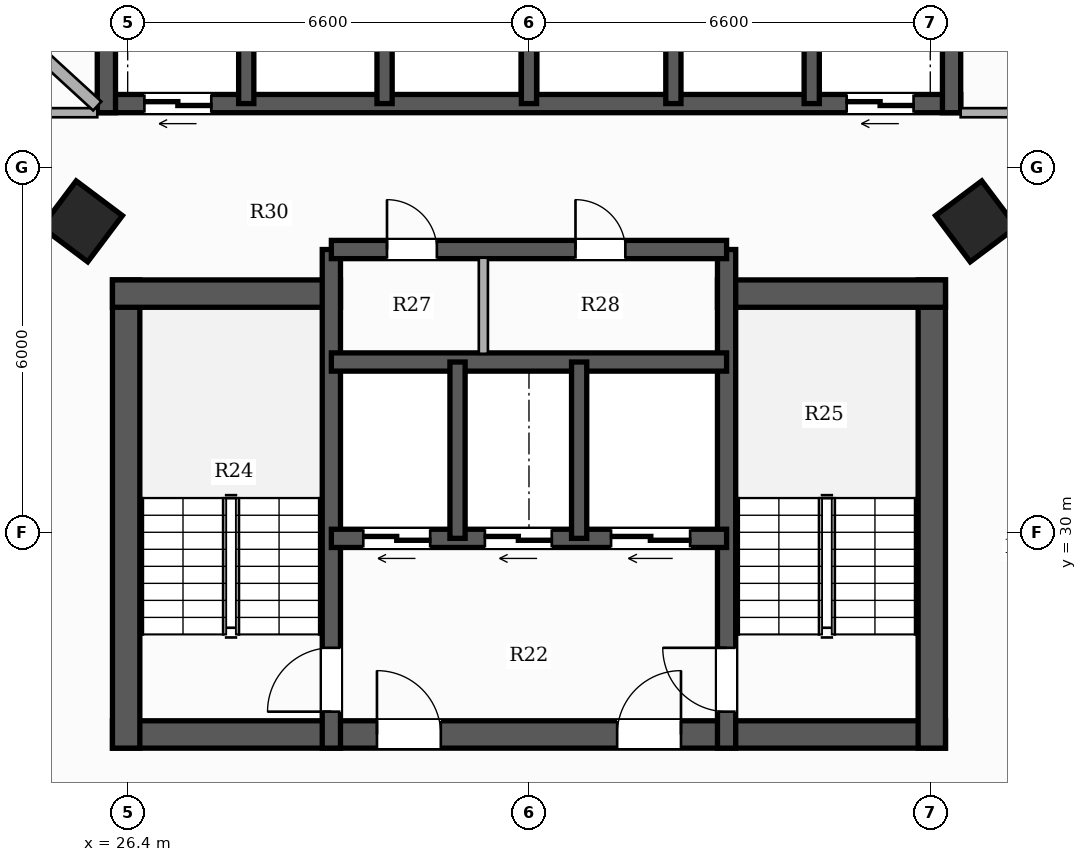
"""IFC4 building model, lengths in metres.
Left out: names, types, materials, properties, quantities, classifications, styles, units other than length and angle.
Written with IfcOpenShell. Run it as: python <this file> out.ifc"""

import sys

from ifc_helpers import new_model, si_unit, direction, frame, frame_2d, origin, origin_2d, place, context, subcontext, project, spatial, rectangle, hollow_rectangle, extrude, element, fill, save


model = new_model("IFC4")
c1 = context("Model", 3, precision=1e-05, world=origin(), true_north=direction((0.0, 1.0)))
c2 = subcontext(c1, "Body", "Model", "MODEL_VIEW")
j1 = project(units=[si_unit("LENGTHUNIT", "METRE"), si_unit("PLANEANGLEUNIT", "RADIAN")], contexts=[c1])
p1 = place(None, origin())
s1 = spatial("IfcSite", under=j1, at=p1, CompositionType="ELEMENT")
p2 = place(p1, origin())
s2 = spatial("IfcBuilding", under=s1, at=p2, CompositionType="ELEMENT")
p3 = place(p2, frame((0.0, 0.0, 33.5)))
s3 = spatial("IfcBuildingStorey", under=s2, at=p3, CompositionType="ELEMENT", Elevation=33.5)
p4 = place(p3, frame((26.15, 26.675, 0.0), z_axis=(0.0, 0.0, 1.0), x_axis=(1.0, 0.0, 0.0)))
e1 = element("IfcWall", 1, at=p4, inside=s3, PredefinedType="SHEAR", context=c2, shape_type="SweptSolid", body=[
    extrude(rectangle(XDim=13.7, YDim=0.45, at=frame_2d((6.85, 0.0))), origin(), (0.0, 0.0, 1.0), 3.3),
])
p5 = place(p4, frame((4.35, 0.0, 0.0)))
e2 = element("IfcOpeningElement", 2, at=p5, cuts=e1, PredefinedType="OPENING", context=c2, shape_type="SweptSolid", body=[
    extrude(rectangle(XDim=1.05, YDim=2.15, at=frame_2d((0.525, 1.075))), frame((0.0, 0.235, 0.0), z_axis=(0.0, -1.0, 0.0), x_axis=(1.0, 0.0, 0.0)), (0.0, 0.0, 1.0), 0.47),
])
p6 = place(p4, frame((8.3, 0.0, 0.0)))
e3 = element("IfcOpeningElement", 3, at=p6, cuts=e1, PredefinedType="OPENING", context=c2, shape_type="SweptSolid", body=[
    extrude(rectangle(XDim=1.05, YDim=2.15, at=frame_2d((0.525, 1.075))), frame((0.0, 0.235, 0.0), z_axis=(0.0, -1.0, 0.0), x_axis=(1.0, 0.0, 0.0)), (0.0, 0.0, 1.0), 0.47),
])
p7 = place(p3, frame((26.375, 26.45, 0.0), z_axis=(0.0, 0.0, 1.0), x_axis=(0.0, 1.0, 0.0)))
e4 = element("IfcWall", 4, at=p7, inside=s3, PredefinedType="SHEAR", context=c2, shape_type="SweptSolid", body=[
    extrude(rectangle(XDim=7.7, YDim=0.45, at=frame_2d((3.85, 0.0))), origin(), (0.0, 0.0, 1.0), 3.3),
])
p8 = place(p3, frame((26.15, 33.925, 0.0), z_axis=(0.0, 0.0, 1.0), x_axis=(1.0, 0.0, 0.0)))
e5 = element("IfcWall", 5, at=p8, inside=s3, PredefinedType="SHEAR", context=c2, shape_type="SweptSolid", body=[
    extrude(rectangle(XDim=3.75, YDim=0.45, at=frame_2d((1.875, 0.0))), origin(), (0.0, 0.0, 1.0), 3.3),
])
p9 = place(p3, frame((39.625, 26.45, 0.0), z_axis=(0.0, 0.0, 1.0), x_axis=(0.0, 1.0, 0.0)))
e6 = element("IfcWall", 6, at=p9, inside=s3, PredefinedType="SHEAR", context=c2, shape_type="SweptSolid", body=[
    extrude(rectangle(XDim=7.7, YDim=0.45, at=frame_2d((3.85, 0.0))), origin(), (0.0, 0.0, 1.0), 3.3),
])
p10 = place(p3, frame((36.1, 33.925, 0.0), z_axis=(0.0, 0.0, 1.0), x_axis=(1.0, 0.0, 0.0)))
e7 = element("IfcWall", 7, at=p10, inside=s3, PredefinedType="SHEAR", context=c2, shape_type="SweptSolid", body=[
    extrude(rectangle(XDim=3.75, YDim=0.45, at=frame_2d((1.875, 0.0))), origin(), (0.0, 0.0, 1.0), 3.3),
])
p11 = place(p3, frame((29.75, 26.45, 0.0), z_axis=(0.0, 0.0, 1.0), x_axis=(0.0, 1.0, 0.0)))
e8 = element("IfcWall", 8, at=p11, inside=s3, PredefinedType="SHEAR", context=c2, shape_type="SweptSolid", body=[
    extrude(rectangle(XDim=8.2, YDim=0.3, at=frame_2d((4.1, 0.0))), origin(), (0.0, 0.0, 1.0), 3.3),
])
p12 = place(p11, frame((0.6, 0.0, 0.0)))
e9 = element("IfcOpeningElement", 9, at=p12, cuts=e8, PredefinedType="OPENING", context=c2, shape_type="SweptSolid", body=[
    extrude(rectangle(XDim=1.05, YDim=2.15, at=frame_2d((0.525, 1.075))), frame((0.0, 0.16, 0.0), z_axis=(0.0, -1.0, 0.0), x_axis=(1.0, 0.0, 0.0)), (0.0, 0.0, 1.0), 0.32),
])
p13 = place(p3, frame((36.25, 26.45, 0.0), z_axis=(0.0, 0.0, 1.0), x_axis=(0.0, 1.0, 0.0)))
e10 = element("IfcWall", 10, at=p13, inside=s3, PredefinedType="SHEAR", context=c2, shape_type="SweptSolid", body=[
    extrude(rectangle(XDim=8.2, YDim=0.3, at=frame_2d((4.1, 0.0))), origin(), (0.0, 0.0, 1.0), 3.3),
])
p14 = place(p13, frame((0.6, 0.0, 0.0)))
e11 = element("IfcOpeningElement", 11, at=p14, cuts=e10, PredefinedType="OPENING", context=c2, shape_type="SweptSolid", body=[
    extrude(rectangle(XDim=1.05, YDim=2.15, at=frame_2d((0.525, 1.075))), frame((0.0, 0.16, 0.0), z_axis=(0.0, -1.0, 0.0), x_axis=(1.0, 0.0, 0.0)), (0.0, 0.0, 1.0), 0.32),
])
p15 = place(p3, frame((36.25, 29.9, 0.0), z_axis=(0.0, 0.0, 1.0), x_axis=(-1.0, 0.0, 0.0)))
e12 = element("IfcWall", 12, at=p15, inside=s3, PredefinedType="SHEAR", context=c2, shape_type="SweptSolid", body=[
    extrude(rectangle(XDim=6.5, YDim=0.3, at=frame_2d((3.25, 0.0))), origin(), (0.0, 0.0, 1.0), 3.3),
])
p16 = place(p15, frame((4.875, 0.0, 0.0)))
e13 = element("IfcOpeningElement", 13, at=p16, cuts=e12, PredefinedType="OPENING", context=c2, shape_type="SweptSolid", body=[
    extrude(rectangle(XDim=1.1, YDim=2.2, at=frame_2d((0.55, 1.1))), frame((0.0, 0.16, 0.0), z_axis=(0.0, -1.0, 0.0), x_axis=(1.0, 0.0, 0.0)), (0.0, 0.0, 1.0), 0.32),
])
p17 = place(p15, frame((2.875, 0.0, 0.0)))
e14 = element("IfcOpeningElement", 14, at=p17, cuts=e12, PredefinedType="OPENING", context=c2, shape_type="SweptSolid", body=[
    extrude(rectangle(XDim=1.1, YDim=2.2, at=frame_2d((0.55, 1.1))), frame((0.0, 0.16, 0.0), z_axis=(0.0, -1.0, 0.0), x_axis=(1.0, 0.0, 0.0)), (0.0, 0.0, 1.0), 0.32),
])
p18 = place(p15, frame((0.6, 0.0, 0.0)))
e15 = element("IfcOpeningElement", 15, at=p18, cuts=e12, PredefinedType="OPENING", context=c2, shape_type="SweptSolid", body=[
    extrude(rectangle(XDim=1.3, YDim=2.2, at=frame_2d((0.65, 1.1))), frame((0.0, 0.16, 0.0), z_axis=(0.0, -1.0, 0.0), x_axis=(1.0, 0.0, 0.0)), (0.0, 0.0, 1.0), 0.32),
])
p19 = place(p3, frame((29.75, 32.8, 0.0), z_axis=(0.0, 0.0, 1.0), x_axis=(1.0, 0.0, 0.0)))
e16 = element("IfcWall", 16, at=p19, inside=s3, PredefinedType="SHEAR", context=c2, shape_type="SweptSolid", body=[
    extrude(rectangle(XDim=6.5, YDim=0.3, at=frame_2d((3.25, 0.0))), origin(), (0.0, 0.0, 1.0), 3.3),
])
for number, where, z_axis, x_axis in (
    (17, (31.825, 29.9, 0.0), (0.0, 0.0, 1.0), (0.0, 1.0, 0.0)),
    (18, (33.825, 29.9, 0.0), (0.0, 0.0, 1.0), (0.0, 1.0, 0.0)),
):
    element("IfcWall", number, at=place(p3, frame(where, z_axis=z_axis, x_axis=x_axis)), inside=s3, PredefinedType="SHEAR", context=c2, shape_type="SweptSolid", body=[
        extrude(rectangle(XDim=2.9, YDim=0.25, at=frame_2d((1.45, 0.0))), origin(), (0.0, 0.0, 1.0), 3.3),
    ])
p20 = place(p3, frame((29.75, 34.65, 0.0), z_axis=(0.0, 0.0, 1.0), x_axis=(1.0, 0.0, 0.0)))
e19 = element("IfcWall", 19, at=p20, inside=s3, PredefinedType="SHEAR", context=c2, shape_type="SweptSolid", body=[
    extrude(rectangle(XDim=6.5, YDim=0.3, at=frame_2d((3.25, 0.0))), origin(), (0.0, 0.0, 1.0), 3.3),
])
p21 = place(p20, frame((0.915, 0.0, 0.0)))
e20 = element("IfcOpeningElement", 20, at=p21, cuts=e19, PredefinedType="OPENING", context=c2, shape_type="SweptSolid", body=[
    extrude(rectangle(XDim=0.82, YDim=2.1, at=frame_2d((0.41, 1.05))), frame((0.0, 0.16, 0.0), z_axis=(0.0, -1.0, 0.0), x_axis=(1.0, 0.0, 0.0)), (0.0, 0.0, 1.0), 0.32),
])
p22 = place(p20, frame((4.015, 0.0, 0.0)))
e21 = element("IfcOpeningElement", 21, at=p22, cuts=e19, PredefinedType="OPENING", context=c2, shape_type="SweptSolid", body=[
    extrude(rectangle(XDim=0.82, YDim=2.1, at=frame_2d((0.41, 1.05))), frame((0.0, 0.16, 0.0), z_axis=(0.0, -1.0, 0.0), x_axis=(1.0, 0.0, 0.0)), (0.0, 0.0, 1.0), 0.32),
])
p23 = place(p3, frame((40.1, 37.05, 0.0), z_axis=(0.0, 0.0, 1.0), x_axis=(-1.0, 0.0, 0.0)))
e22 = element("IfcWall", 22, at=p23, inside=s3, PredefinedType="SHEAR", context=c2, shape_type="SweptSolid", body=[
    extrude(rectangle(XDim=14.2, YDim=0.3, at=frame_2d((7.1, 0.0))), origin(), (0.0, 0.0, 1.0), 3.3),
])
p24 = place(p23, frame((12.325, 0.0, 0.0)))
e23 = element("IfcOpeningElement", 23, at=p24, cuts=e22, PredefinedType="OPENING", context=c2, shape_type="SweptSolid", body=[
    extrude(rectangle(XDim=1.1, YDim=2.2, at=frame_2d((0.55, 1.1))), frame((0.0, 0.16, 0.0), z_axis=(0.0, -1.0, 0.0), x_axis=(1.0, 0.0, 0.0)), (0.0, 0.0, 1.0), 0.32),
])
p25 = place(p23, frame((0.775, 0.0, 0.0)))
e24 = element("IfcOpeningElement", 24, at=p25, cuts=e22, PredefinedType="OPENING", context=c2, shape_type="SweptSolid", body=[
    extrude(rectangle(XDim=1.1, YDim=2.2, at=frame_2d((0.55, 1.1))), frame((0.0, 0.16, 0.0), z_axis=(0.0, -1.0, 0.0), x_axis=(1.0, 0.0, 0.0)), (0.0, 0.0, 1.0), 0.32),
])
for number, where, z_axis, x_axis in (
    (25, (26.05, 36.9, 0.0), (0.0, 0.0, 1.0), (0.0, 1.0, 0.0)),
    (26, (39.95, 36.9, 0.0), (0.0, 0.0, 1.0), (0.0, 1.0, 0.0)),
):
    element("IfcWall", number, at=place(p3, frame(where, z_axis=z_axis, x_axis=x_axis)), inside=s3, PredefinedType="SHEAR", context=c2, shape_type="SweptSolid", body=[
        extrude(rectangle(XDim=2.85, YDim=0.3, at=frame_2d((1.425, 0.0))), origin(), (0.0, 0.0, 1.0), 3.3),
    ])
for number, where, z_axis, x_axis in (
    (27, (28.35, 37.05, 0.0), (0.0, 0.0, 1.0), (0.0, 1.0, 0.0)),
    (28, (30.625, 37.05, 0.0), (0.0, 0.0, 1.0), (0.0, 1.0, 0.0)),
    (29, (33.0, 37.05, 0.0), (0.0, 0.0, 1.0), (0.0, 1.0, 0.0)),
    (30, (35.375, 37.05, 0.0), (0.0, 0.0, 1.0), (0.0, 1.0, 0.0)),
    (31, (37.65, 37.05, 0.0), (0.0, 0.0, 1.0), (0.0, 1.0, 0.0)),
):
    element("IfcWall", number, at=place(p3, frame(where, z_axis=z_axis, x_axis=x_axis)), inside=s3, PredefinedType="SHEAR", context=c2, shape_type="SweptSolid", body=[
        extrude(rectangle(XDim=2.55, YDim=0.25, at=frame_2d((1.275, 0.0))), origin(), (0.0, 0.0, 1.0), 3.3),
    ])
for number, where, z_axis, x_axis in (
    (32, (25.648, 35.113, 0.0), (0.0, 0.0, 1.0), (0.6, 0.8, 0.0)),
    (33, (40.352, 35.113, 0.0), (0.0, 0.0, 1.0), (-0.6, 0.8, 0.0)),
):
    element("IfcColumn", number, at=place(p3, frame(where, z_axis=z_axis, x_axis=x_axis)), inside=s3, PredefinedType="COLUMN", context=c2, shape_type="SweptSolid", body=[
        extrude(hollow_rectangle(XDim=0.95, YDim=0.95, WallThickness=0.032, at=origin_2d()), origin(), (0.0, 0.0, 1.0), 3.3),
    ])
p26 = place(p3, frame((32.25, 32.935, 0.0), z_axis=(0.0, 0.0, 1.0), x_axis=(0.0, 1.0, 0.0)))
e34 = element("IfcWall", 34, at=p26, inside=s3, PredefinedType="PARTITIONING", context=c2, shape_type="SweptSolid", body=[
    extrude(rectangle(XDim=1.58, YDim=0.15, at=frame_2d((0.79, 0.0))), origin(), (0.0, 0.0, 1.0), 3.06),
])
p27 = place(p3, frame((40.1, 36.9, 0.0), z_axis=(0.0, 0.0, 1.0), x_axis=(1.0, 0.0, 0.0)))
e35 = element("IfcWall", 35, at=p27, inside=s3, PredefinedType="PARTITIONING", context=c2, shape_type="SweptSolid", body=[
    extrude(rectangle(XDim=2.55, YDim=0.15, at=frame_2d((1.275, 0.0))), origin(), (0.0, 0.0, 1.0), 2.413),
])
p28 = place(p3, frame((23.41, 36.9, 0.0), z_axis=(0.0, 0.0, 1.0), x_axis=(1.0, 0.0, 0.0)))
e36 = element("IfcWall", 36, at=p28, inside=s3, PredefinedType="PARTITIONING", context=c2, shape_type="SweptSolid", body=[
    extrude(rectangle(XDim=2.49, YDim=0.15, at=frame_2d((1.245, 0.0))), origin(), (0.0, 0.0, 1.0), 2.413),
])
p29 = place(p3, frame((25.9, 37.01, 0.0), z_axis=(0.0, 0.0, 1.0), x_axis=(-0.737010798249, 0.675880968266, 0.0)))
e37 = element("IfcWall", 37, at=p29, inside=s3, PredefinedType="PARTITIONING", context=c2, shape_type="SweptSolid", body=[
    extrude(rectangle(XDim=5.02, YDim=0.2, at=frame_2d((2.51, 0.0))), origin(), (0.0, 0.0, 1.0), 3.06),
])
p30 = place(p12, origin())
e38 = element("IfcDoor", 38, at=p30, inside=s3, OperationType="SINGLE_SWING_LEFT", PredefinedType="DOOR", context=c2, shape_type="SweptSolid", body=[
    extrude(rectangle(XDim=1.05, YDim=2.15, at=frame_2d((0.525, 1.075))), frame((0.0, 0.025, 0.0), z_axis=(0.0, -1.0, 0.0), x_axis=(1.0, 0.0, 0.0)), (0.0, 0.0, 1.0), 0.05),
])
fill(e9, e38)
p31 = place(p14, origin())
e39 = element("IfcDoor", 39, at=p31, inside=s3, OperationType="SINGLE_SWING_RIGHT", PredefinedType="DOOR", context=c2, shape_type="SweptSolid", body=[
    extrude(rectangle(XDim=1.05, YDim=2.15, at=frame_2d((0.525, 1.075))), frame((0.0, 0.025, 0.0), z_axis=(0.0, -1.0, 0.0), x_axis=(1.0, 0.0, 0.0)), (0.0, 0.0, 1.0), 0.05),
])
fill(e11, e39)
p32 = place(p5, origin())
e40 = element("IfcDoor", 40, at=p32, inside=s3, OperationType="SINGLE_SWING_LEFT", PredefinedType="DOOR", context=c2, shape_type="SweptSolid", body=[
    extrude(rectangle(XDim=1.05, YDim=2.15, at=frame_2d((0.525, 1.075))), frame((0.0, 0.025, 0.0), z_axis=(0.0, -1.0, 0.0), x_axis=(1.0, 0.0, 0.0)), (0.0, 0.0, 1.0), 0.05),
])
fill(e2, e40)
p33 = place(p6, origin())
e41 = element("IfcDoor", 41, at=p33, inside=s3, OperationType="SINGLE_SWING_RIGHT", PredefinedType="DOOR", context=c2, shape_type="SweptSolid", body=[
    extrude(rectangle(XDim=1.05, YDim=2.15, at=frame_2d((0.525, 1.075))), frame((0.0, 0.025, 0.0), z_axis=(0.0, -1.0, 0.0), x_axis=(1.0, 0.0, 0.0)), (0.0, 0.0, 1.0), 0.05),
])
fill(e3, e41)
p34 = place(p16, origin())
e42 = element("IfcDoor", 42, at=p34, inside=s3, OperationType="DOUBLE_DOOR_SLIDING", PredefinedType="DOOR", context=c2, shape_type="SweptSolid", body=[
    extrude(rectangle(XDim=1.1, YDim=2.2, at=frame_2d((0.55, 1.1))), frame((0.0, 0.025, 0.0), z_axis=(0.0, -1.0, 0.0), x_axis=(1.0, 0.0, 0.0)), (0.0, 0.0, 1.0), 0.05),
])
fill(e13, e42)
p35 = place(p17, origin())
e43 = element("IfcDoor", 43, at=p35, inside=s3, OperationType="DOUBLE_DOOR_SLIDING", PredefinedType="DOOR", context=c2, shape_type="SweptSolid", body=[
    extrude(rectangle(XDim=1.1, YDim=2.2, at=frame_2d((0.55, 1.1))), frame((0.0, 0.025, 0.0), z_axis=(0.0, -1.0, 0.0), x_axis=(1.0, 0.0, 0.0)), (0.0, 0.0, 1.0), 0.05),
])
fill(e14, e43)
p36 = place(p18, origin())
e44 = element("IfcDoor", 44, at=p36, inside=s3, OperationType="DOUBLE_DOOR_SLIDING", PredefinedType="DOOR", context=c2, shape_type="SweptSolid", body=[
    extrude(rectangle(XDim=1.3, YDim=2.2, at=frame_2d((0.65, 1.1))), frame((0.0, 0.025, 0.0), z_axis=(0.0, -1.0, 0.0), x_axis=(1.0, 0.0, 0.0)), (0.0, 0.0, 1.0), 0.05),
])
fill(e15, e44)
p37 = place(p24, origin())
e45 = element("IfcDoor", 45, at=p37, inside=s3, OperationType="DOUBLE_DOOR_SLIDING", PredefinedType="DOOR", context=c2, shape_type="SweptSolid", body=[
    extrude(rectangle(XDim=1.1, YDim=2.2, at=frame_2d((0.55, 1.1))), frame((0.0, 0.025, 0.0), z_axis=(0.0, -1.0, 0.0), x_axis=(1.0, 0.0, 0.0)), (0.0, 0.0, 1.0), 0.05),
])
fill(e23, e45)
p38 = place(p25, origin())
e46 = element("IfcDoor", 46, at=p38, inside=s3, OperationType="DOUBLE_DOOR_SLIDING", PredefinedType="DOOR", context=c2, shape_type="SweptSolid", body=[
    extrude(rectangle(XDim=1.1, YDim=2.2, at=frame_2d((0.55, 1.1))), frame((0.0, 0.025, 0.0), z_axis=(0.0, -1.0, 0.0), x_axis=(1.0, 0.0, 0.0)), (0.0, 0.0, 1.0), 0.05),
])
fill(e24, e46)
p39 = place(p21, origin())
e47 = element("IfcDoor", 47, at=p39, inside=s3, OperationType="SINGLE_SWING_LEFT", PredefinedType="DOOR", context=c2, shape_type="SweptSolid", body=[
    extrude(rectangle(XDim=0.82, YDim=2.1, at=frame_2d((0.41, 1.05))), frame((0.0, 0.025, 0.0), z_axis=(0.0, -1.0, 0.0), x_axis=(1.0, 0.0, 0.0)), (0.0, 0.0, 1.0), 0.05),
])
fill(e20, e47)
p40 = place(p22, origin())
e48 = element("IfcDoor", 48, at=p40, inside=s3, OperationType="SINGLE_SWING_LEFT", PredefinedType="DOOR", context=c2, shape_type="SweptSolid", body=[
    extrude(rectangle(XDim=0.82, YDim=2.1, at=frame_2d((0.41, 1.05))), frame((0.0, 0.025, 0.0), z_axis=(0.0, -1.0, 0.0), x_axis=(1.0, 0.0, 0.0)), (0.0, 0.0, 1.0), 0.05),
])
fill(e21, e48)
save(model, sys.argv[1])
